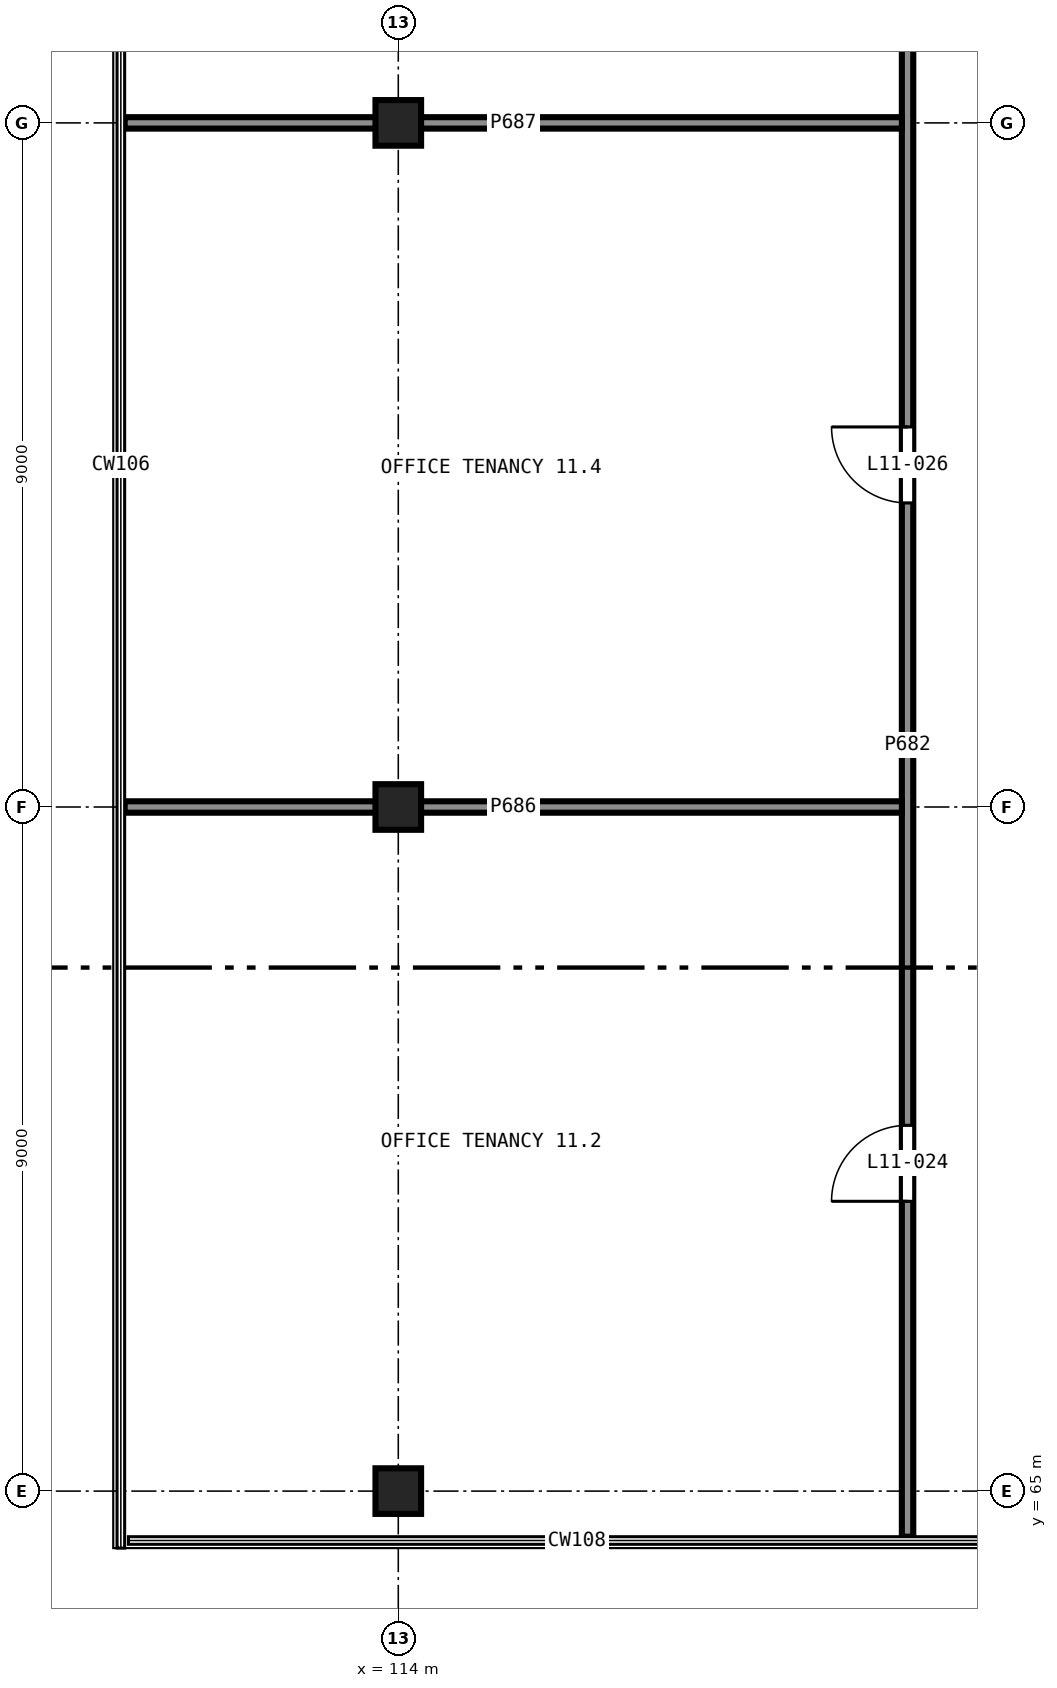
"""IFC4 building model, lengths in metres.
Left out: names, types, materials, properties, quantities, classifications, styles, units other than length and angle.
Written with IfcOpenShell. Run it as: python <this file> out.ifc"""

import sys

from ifc_helpers import new_model, si_unit, direction, frame, frame_2d, origin, origin_2d, place, context, subcontext, project, spatial, rectangle, extrude, element, fill, save


model = new_model("IFC4")
c1 = context("Model", 3, precision=1e-05, world=origin(), true_north=direction((0.0, 1.0)))
c2 = subcontext(c1, "Body", "Model", "MODEL_VIEW")
j1 = project(units=[si_unit("LENGTHUNIT", "METRE"), si_unit("PLANEANGLEUNIT", "RADIAN")], contexts=[c1])
p1 = place(None, origin())
s1 = spatial("IfcSite", under=j1, at=p1, CompositionType="ELEMENT")
p2 = place(p1, origin())
s2 = spatial("IfcBuilding", under=s1, at=p2, CompositionType="ELEMENT")
p3 = place(p2, frame((0.0, 0.0, 45.5)))
s3 = spatial("IfcBuildingStorey", under=s2, at=p3, CompositionType="ELEMENT", Elevation=45.5)
for number, where, z_axis, x_axis in (
    (1, (114.0, 65.0, 0.0), (0.0, 0.0, 1.0), (1.0, 0.0, 0.0)),
    (2, (114.0, 74.0, 0.0), (0.0, 0.0, 1.0), (1.0, 0.0, 0.0)),
    (3, (114.0, 83.0, 0.0), (0.0, 0.0, 1.0), (1.0, 0.0, 0.0)),
):
    element("IfcColumn", number, at=place(p3, frame(where, z_axis=z_axis, x_axis=x_axis)), inside=s3, PredefinedType="COLUMN", context=c2, shape_type="SweptSolid", body=[
        extrude(rectangle(XDim=0.6, YDim=0.6, at=origin_2d()), origin(), (0.0, 0.0, 1.0), 4.0),
    ])
p4 = place(p3, frame((120.7, 64.4, 0.0), z_axis=(0.0, 0.0, 1.0), x_axis=(0.0, 1.0, 0.0)))
e4 = element("IfcWall", 4, at=p4, inside=s3, PredefinedType="PARTITIONING", context=c2, shape_type="SweptSolid", body=[
    extrude(rectangle(XDim=20.825, YDim=0.15, at=frame_2d((10.413, 0.0))), origin(), (0.0, 0.0, 1.0), 3.75),
])
p5 = place(p4, frame((4.413, 0.0, 0.0)))
e5 = element("IfcOpeningElement", 5, at=p5, cuts=e4, PredefinedType="OPENING", context=c2, shape_type="SweptSolid", body=[
    extrude(rectangle(XDim=1.0, YDim=2.1, at=frame_2d((0.5, 1.05))), frame((0.0, 0.085, 0.0), z_axis=(0.0, -1.0, 0.0), x_axis=(1.0, 0.0, 0.0)), (0.0, 0.0, 1.0), 0.17),
])
p6 = place(p4, frame((13.6, 0.0, 0.0)))
e6 = element("IfcOpeningElement", 6, at=p6, cuts=e4, PredefinedType="OPENING", context=c2, shape_type="SweptSolid", body=[
    extrude(rectangle(XDim=1.0, YDim=2.1, at=frame_2d((0.5, 1.05))), frame((0.0, 0.085, 0.0), z_axis=(0.0, -1.0, 0.0), x_axis=(1.0, 0.0, 0.0)), (0.0, 0.0, 1.0), 0.17),
])
for number, where, z_axis, x_axis in (
    (7, (110.4, 74.0, 0.0), (0.0, 0.0, 1.0), (1.0, 0.0, 0.0)),
    (8, (110.4, 83.0, 0.0), (0.0, 0.0, 1.0), (1.0, 0.0, 0.0)),
):
    element("IfcWall", number, at=place(p3, frame(where, z_axis=z_axis, x_axis=x_axis)), inside=s3, PredefinedType="PARTITIONING", context=c2, shape_type="SweptSolid", body=[
        extrude(rectangle(XDim=10.226, YDim=0.15, at=frame_2d((5.113, 0.0))), origin(), (0.0, 0.0, 1.0), 2.85),
    ])
p7 = place(p5, origin())
e9 = element("IfcDoor", 9, at=p7, inside=s3, OperationType="SINGLE_SWING_RIGHT", PredefinedType="DOOR", context=c2, shape_type="SweptSolid", body=[
    extrude(rectangle(XDim=1.0, YDim=2.1, at=frame_2d((0.5, 1.05))), frame((0.0, 0.025, 0.0), z_axis=(0.0, -1.0, 0.0), x_axis=(1.0, 0.0, 0.0)), (0.0, 0.0, 1.0), 0.05),
])
fill(e5, e9)
p8 = place(p6, origin())
e10 = element("IfcDoor", 10, at=p8, inside=s3, OperationType="SINGLE_SWING_LEFT", PredefinedType="DOOR", context=c2, shape_type="SweptSolid", body=[
    extrude(rectangle(XDim=1.0, YDim=2.1, at=frame_2d((0.5, 1.05))), frame((0.0, 0.025, 0.0), z_axis=(0.0, -1.0, 0.0), x_axis=(1.0, 0.0, 0.0)), (0.0, 0.0, 1.0), 0.05),
])
fill(e6, e10)
save(model, sys.argv[1])
